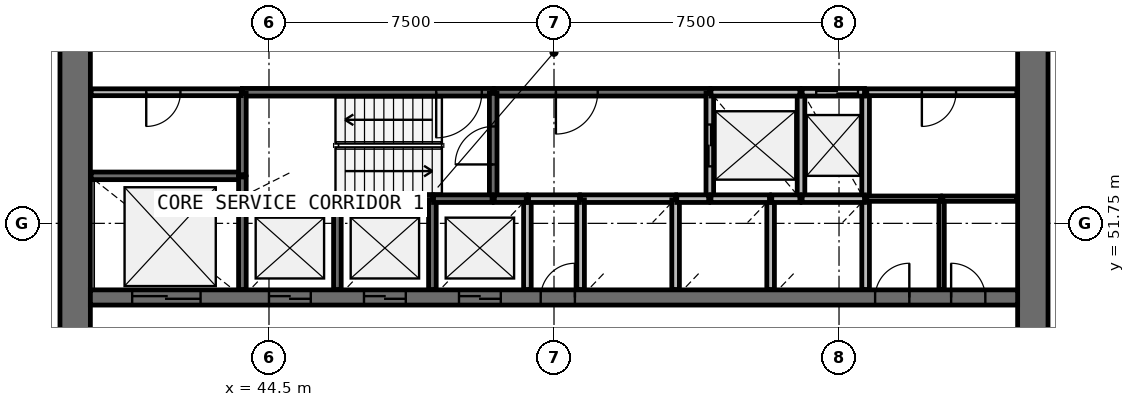
"""IFC4 building model, lengths in metres.
Left out: names, types, materials, properties, quantities, classifications, styles, units other than length and angle.
Written with IfcOpenShell. Run it as: python <this file> out.ifc"""

import sys

from ifc_helpers import new_model, si_unit, direction, frame, frame_2d, origin, place, context, subcontext, project, spatial, rectangle, extrude, source, transform, mapped, element, fill, save


model = new_model("IFC4")
c1 = context("Model", 3, precision=1e-05, world=origin(), true_north=direction((0.0, 1.0)))
c2 = subcontext(c1, "Body", "Model", "MODEL_VIEW")
j1 = project(units=[si_unit("LENGTHUNIT", "METRE"), si_unit("PLANEANGLEUNIT", "RADIAN")], contexts=[c1])
p1 = place(None, origin())
s1 = spatial("IfcSite", under=j1, at=p1, CompositionType="ELEMENT")
p2 = place(p1, origin())
s2 = spatial("IfcBuilding", under=s1, at=p2, CompositionType="ELEMENT")
p3 = place(p2, frame((0.0, 0.0, 116.7)))
s3 = spatial("IfcBuildingStorey", under=s2, at=p3, CompositionType="ELEMENT", Elevation=116.7)
p4 = place(p3, frame((64.6, 38.0, 0.0), z_axis=(0.0, 0.0, 1.0), x_axis=(0.0, 1.0, 0.0)))
e1 = element("IfcWall", 1, at=p4, inside=s3, PredefinedType="SHEAR", context=c2, shape_type="SweptSolid", body=[
    extrude(rectangle(XDim=20.0, YDim=0.8, at=frame_2d((10.0, 0.0))), origin(), (0.0, 0.0, 1.0), 4.1),
])
p5 = place(p4, frame((9.1, 0.0, 0.0)))
e2 = element("IfcOpeningElement", 2, at=p5, cuts=e1, PredefinedType="OPENING", context=c2, shape_type="SweptSolid", body=[
    extrude(rectangle(XDim=1.8, YDim=2.1, at=frame_2d((0.9, 1.05))), frame((0.0, 0.41, 0.0), z_axis=(0.0, -1.0, 0.0), x_axis=(1.0, 0.0, 0.0)), (0.0, 0.0, 1.0), 0.82),
])
p6 = place(p3, frame((39.4, 58.0, 0.0), z_axis=(0.0, 0.0, 1.0), x_axis=(0.0, -1.0, 0.0)))
e3 = element("IfcWall", 3, at=p6, inside=s3, PredefinedType="SHEAR", context=c2, shape_type="SweptSolid", body=[
    extrude(rectangle(XDim=20.0, YDim=0.8, at=frame_2d((10.0, 0.0))), origin(), (0.0, 0.0, 1.0), 4.1),
])
p7 = place(p6, frame((9.1, 0.0, 0.0)))
e4 = element("IfcOpeningElement", 4, at=p7, cuts=e3, PredefinedType="OPENING", context=c2, shape_type="SweptSolid", body=[
    extrude(rectangle(XDim=1.8, YDim=2.1, at=frame_2d((0.9, 1.05))), frame((0.0, 0.41, 0.0), z_axis=(0.0, -1.0, 0.0), x_axis=(1.0, 0.0, 0.0)), (0.0, 0.0, 1.0), 0.82),
])
p8 = place(p3, frame((39.8, 49.8, 0.0), z_axis=(0.0, 0.0, 1.0), x_axis=(1.0, 0.0, 0.0)))
e5 = element("IfcWall", 5, at=p8, inside=s3, PredefinedType="SHEAR", context=c2, shape_type="SweptSolid", body=[
    extrude(rectangle(XDim=24.4, YDim=0.4, at=frame_2d((12.2, 0.0))), origin(), (0.0, 0.0, 1.0), 4.1),
])
p9 = place(p8, frame((4.7, 0.0, 0.0)))
e6 = element("IfcOpeningElement", 6, at=p9, cuts=e5, PredefinedType="OPENING", context=c2, shape_type="SweptSolid", body=[
    extrude(rectangle(XDim=1.1, YDim=2.1, at=frame_2d((0.55, 1.05))), frame((0.0, 0.21, 0.0), z_axis=(0.0, -1.0, 0.0), x_axis=(1.0, 0.0, 0.0)), (0.0, 0.0, 1.0), 0.42),
])
p10 = place(p8, frame((7.2, 0.0, 0.0)))
e7 = element("IfcOpeningElement", 7, at=p10, cuts=e5, PredefinedType="OPENING", context=c2, shape_type="SweptSolid", body=[
    extrude(rectangle(XDim=1.1, YDim=2.1, at=frame_2d((0.55, 1.05))), frame((0.0, 0.21, 0.0), z_axis=(0.0, -1.0, 0.0), x_axis=(1.0, 0.0, 0.0)), (0.0, 0.0, 1.0), 0.42),
])
p11 = place(p8, frame((9.7, 0.0, 0.0)))
e8 = element("IfcOpeningElement", 8, at=p11, cuts=e5, PredefinedType="OPENING", context=c2, shape_type="SweptSolid", body=[
    extrude(rectangle(XDim=1.1, YDim=2.1, at=frame_2d((0.55, 1.05))), frame((0.0, 0.21, 0.0), z_axis=(0.0, -1.0, 0.0), x_axis=(1.0, 0.0, 0.0)), (0.0, 0.0, 1.0), 0.42),
])
p12 = place(p8, frame((1.1, 0.0, 0.0)))
e9 = element("IfcOpeningElement", 9, at=p12, cuts=e5, PredefinedType="OPENING", context=c2, shape_type="SweptSolid", body=[
    extrude(rectangle(XDim=1.8, YDim=2.4, at=frame_2d((0.9, 1.2))), frame((0.0, 0.21, 0.0), z_axis=(0.0, -1.0, 0.0), x_axis=(1.0, 0.0, 0.0)), (0.0, 0.0, 1.0), 0.42),
])
p13 = place(p8, frame((20.65, 0.0, 0.0)))
e10 = element("IfcOpeningElement", 10, at=p13, cuts=e5, PredefinedType="OPENING", context=c2, shape_type="SweptSolid", body=[
    extrude(rectangle(XDim=0.9, YDim=2.1, at=frame_2d((0.45, 1.05))), frame((0.0, 0.21, 0.0), z_axis=(0.0, -1.0, 0.0), x_axis=(1.0, 0.0, 0.0)), (0.0, 0.0, 1.0), 0.42),
])
p14 = place(p8, frame((22.65, 0.0, 0.0)))
e11 = element("IfcOpeningElement", 11, at=p14, cuts=e5, PredefinedType="OPENING", context=c2, shape_type="SweptSolid", body=[
    extrude(rectangle(XDim=0.9, YDim=2.1, at=frame_2d((0.45, 1.05))), frame((0.0, 0.21, 0.0), z_axis=(0.0, -1.0, 0.0), x_axis=(1.0, 0.0, 0.0)), (0.0, 0.0, 1.0), 0.42),
])
p15 = place(p8, frame((11.85, 0.0, 0.0)))
e12 = element("IfcOpeningElement", 12, at=p15, cuts=e5, PredefinedType="OPENING", context=c2, shape_type="SweptSolid", body=[
    extrude(rectangle(XDim=0.9, YDim=2.1, at=frame_2d((0.45, 1.05))), frame((0.0, 0.21, 0.0), z_axis=(0.0, -1.0, 0.0), x_axis=(1.0, 0.0, 0.0)), (0.0, 0.0, 1.0), 0.42),
])
p16 = place(p3, frame((50.4, 55.2, 0.0), z_axis=(0.0, 0.0, 1.0), x_axis=(-1.0, 0.0, 0.0)))
e13 = element("IfcWall", 13, at=p16, inside=s3, PredefinedType="SOLIDWALL", context=c2, shape_type="SweptSolid", body=[
    extrude(rectangle(XDim=6.6, YDim=0.2, at=frame_2d((3.3, 0.0))), origin(), (0.0, 0.0, 1.0), 3.7),
])
p17 = place(p16, frame((0.3, 0.0, 0.0)))
e14 = element("IfcOpeningElement", 14, at=p17, cuts=e13, PredefinedType="OPENING", context=c2, shape_type="SweptSolid", body=[
    extrude(rectangle(XDim=1.2, YDim=2.1, at=frame_2d((0.6, 1.05))), frame((0.0, 0.11, 0.0), z_axis=(0.0, -1.0, 0.0), x_axis=(1.0, 0.0, 0.0)), (0.0, 0.0, 1.0), 0.22),
])
p18 = place(p3, frame((56.1, 55.2, 0.0), z_axis=(0.0, 0.0, 1.0), x_axis=(-1.0, 0.0, 0.0)))
e15 = element("IfcWall", 15, at=p18, inside=s3, PredefinedType="SOLIDWALL", context=c2, shape_type="SweptSolid", body=[
    extrude(rectangle(XDim=5.67, YDim=0.2, at=frame_2d((2.835, 0.0))), origin(), (0.0, 0.0, 1.0), 3.7),
])
p19 = place(p18, frame((2.95, 0.0, 0.0)))
e16 = element("IfcOpeningElement", 16, at=p19, cuts=e15, PredefinedType="OPENING", context=c2, shape_type="SweptSolid", body=[
    extrude(rectangle(XDim=1.1, YDim=2.1, at=frame_2d((0.55, 1.05))), frame((0.0, 0.11, 0.0), z_axis=(0.0, -1.0, 0.0), x_axis=(1.0, 0.0, 0.0)), (0.0, 0.0, 1.0), 0.22),
])
p20 = place(p3, frame((43.8, 53.0, 0.0), z_axis=(0.0, 0.0, 1.0), x_axis=(-1.0, 0.0, 0.0)))
e17 = element("IfcWall", 17, at=p20, inside=s3, PredefinedType="SOLIDWALL", context=c2, shape_type="SweptSolid", body=[
    extrude(rectangle(XDim=3.98, YDim=0.2, at=frame_2d((1.99, 0.0))), origin(), (0.0, 0.0, 1.0), 3.7),
])
p21 = place(p3, frame((50.4, 52.4, 0.0), z_axis=(0.0, 0.0, 1.0), x_axis=(0.0, 1.0, 0.0)))
e18 = element("IfcWall", 18, at=p21, inside=s3, PredefinedType="SOLIDWALL", context=c2, shape_type="SweptSolid", body=[
    extrude(rectangle(XDim=2.77, YDim=0.2, at=frame_2d((1.385, 0.0))), origin(), (0.0, 0.0, 1.0), 3.7),
])
p22 = place(p21, frame((0.9, 0.0, 0.0)))
e19 = element("IfcOpeningElement", 19, at=p22, cuts=e18, PredefinedType="OPENING", context=c2, shape_type="SweptSolid", body=[
    extrude(rectangle(XDim=1.0, YDim=2.1, at=frame_2d((0.5, 1.05))), frame((0.0, 0.11, 0.0), z_axis=(0.0, -1.0, 0.0), x_axis=(1.0, 0.0, 0.0)), (0.0, 0.0, 1.0), 0.22),
])
p23 = place(p3, frame((56.1, 55.17, 0.0), z_axis=(0.0, 0.0, 1.0), x_axis=(0.0, -1.0, 0.0)))
e20 = element("IfcWall", 20, at=p23, inside=s3, PredefinedType="SOLIDWALL", context=c2, shape_type="SweptSolid", body=[
    extrude(rectangle(XDim=2.77, YDim=0.2, at=frame_2d((1.385, 0.0))), origin(), (0.0, 0.0, 1.0), 3.7),
])
p24 = place(p23, frame((0.82, 0.0, 0.0)))
e21 = element("IfcOpeningElement", 21, at=p24, cuts=e20, PredefinedType="OPENING", context=c2, shape_type="SweptSolid", body=[
    extrude(rectangle(XDim=1.1, YDim=2.1, at=frame_2d((0.55, 1.05))), frame((0.0, 0.11, 0.0), z_axis=(0.0, -1.0, 0.0), x_axis=(1.0, 0.0, 0.0)), (0.0, 0.0, 1.0), 0.22),
])
for number, where, z_axis, x_axis in (
    (22, (58.5, 52.4, 0.0), (0.0, 0.0, 1.0), (0.0, 1.0, 0.0)),
    (23, (60.2, 52.4, 0.0), (0.0, 0.0, 1.0), (0.0, 1.0, 0.0)),
):
    element("IfcWall", number, at=place(p3, frame(where, z_axis=z_axis, x_axis=x_axis)), inside=s3, PredefinedType="SOLIDWALL", context=c2, shape_type="SweptSolid", body=[
        extrude(rectangle(XDim=2.8, YDim=0.2, at=frame_2d((1.4, 0.0))), origin(), (0.0, 0.0, 1.0), 3.7),
    ])
p25 = place(p3, frame((46.3, 52.4, 0.0), z_axis=(0.0, 0.0, 1.0), x_axis=(-1.0, 0.0, 0.0)))
e24 = element("IfcWall", 24, at=p25, inside=s3, PredefinedType="SOLIDWALL", context=c2, shape_type="SweptSolid", body=[
    extrude(rectangle(XDim=2.5, YDim=0.2, at=frame_2d((1.25, 0.0))), origin(), (0.0, 0.0, 1.0), 3.7),
])
p26 = place(p3, frame((48.8, 52.4, 0.0), z_axis=(0.0, 0.0, 1.0), x_axis=(-1.0, 0.0, 0.0)))
e25 = element("IfcWall", 25, at=p26, inside=s3, PredefinedType="SOLIDWALL", context=c2, shape_type="SweptSolid", body=[
    extrude(rectangle(XDim=2.47, YDim=0.2, at=frame_2d((1.235, 0.0))), origin(), (0.0, 0.0, 1.0), 3.7),
])
p27 = place(p3, frame((55.2, 52.4, 0.0), z_axis=(0.0, 0.0, 1.0), x_axis=(-1.0, 0.0, 0.0)))
e26 = element("IfcWall", 26, at=p27, inside=s3, PredefinedType="SOLIDWALL", context=c2, shape_type="SweptSolid", body=[
    extrude(rectangle(XDim=2.5, YDim=0.2, at=frame_2d((1.25, 0.0))), origin(), (0.0, 0.0, 1.0), 3.7),
])
p28 = place(p3, frame((58.47, 55.2, 0.0), z_axis=(0.0, 0.0, 1.0), x_axis=(-1.0, 0.0, 0.0)))
e27 = element("IfcWall", 27, at=p28, inside=s3, PredefinedType="SOLIDWALL", context=c2, shape_type="SweptSolid", body=[
    extrude(rectangle(XDim=2.34, YDim=0.2, at=frame_2d((1.17, 0.0))), origin(), (0.0, 0.0, 1.0), 3.7),
])
for number, where, z_axis, x_axis in (
    (28, (43.8, 52.37, 0.0), (0.0, 0.0, 1.0), (0.0, -1.0, 0.0)),
    (29, (46.3, 50.01, 0.0), (0.0, 0.0, 1.0), (0.0, 1.0, 0.0)),
    (30, (48.8, 50.01, 0.0), (0.0, 0.0, 1.0), (0.0, 1.0, 0.0)),
):
    element("IfcWall", number, at=place(p3, frame(where, z_axis=z_axis, x_axis=x_axis)), inside=s3, PredefinedType="SOLIDWALL", context=c2, shape_type="SweptSolid", body=[
        extrude(rectangle(XDim=2.36, YDim=0.2, at=frame_2d((1.18, 0.0))), origin(), (0.0, 0.0, 1.0), 3.7),
    ])
p29 = place(p3, frame((51.3, 50.01, 0.0), z_axis=(0.0, 0.0, 1.0), x_axis=(0.0, 1.0, 0.0)))
e31 = element("IfcWall", 31, at=p29, inside=s3, PredefinedType="SOLIDWALL", context=c2, shape_type="SweptSolid", body=[
    extrude(rectangle(XDim=2.39, YDim=0.2, at=frame_2d((1.195, 0.0))), origin(), (0.0, 0.0, 1.0), 3.7),
])
for number, where, z_axis, x_axis in (
    (32, (52.7, 52.37, 0.0), (0.0, 0.0, 1.0), (0.0, -1.0, 0.0)),
    (33, (55.2, 50.01, 0.0), (0.0, 0.0, 1.0), (0.0, 1.0, 0.0)),
):
    element("IfcWall", number, at=place(p3, frame(where, z_axis=z_axis, x_axis=x_axis)), inside=s3, PredefinedType="SOLIDWALL", context=c2, shape_type="SweptSolid", body=[
        extrude(rectangle(XDim=2.36, YDim=0.2, at=frame_2d((1.18, 0.0))), origin(), (0.0, 0.0, 1.0), 3.7),
    ])
p30 = place(p3, frame((57.7, 50.01, 0.0), z_axis=(0.0, 0.0, 1.0), x_axis=(0.0, 1.0, 0.0)))
e34 = element("IfcWall", 34, at=p30, inside=s3, PredefinedType="SOLIDWALL", context=c2, shape_type="SweptSolid", body=[
    extrude(rectangle(XDim=2.39, YDim=0.2, at=frame_2d((1.195, 0.0))), origin(), (0.0, 0.0, 1.0), 3.7),
])
p31 = place(p3, frame((60.2, 50.01, 0.0), z_axis=(0.0, 0.0, 1.0), x_axis=(0.0, 1.0, 0.0)))
e35 = element("IfcWall", 35, at=p31, inside=s3, PredefinedType="SOLIDWALL", context=c2, shape_type="SweptSolid", body=[
    extrude(rectangle(XDim=2.36, YDim=0.2, at=frame_2d((1.18, 0.0))), origin(), (0.0, 0.0, 1.0), 3.7),
])
p32 = place(p3, frame((43.8, 55.17, 0.0), z_axis=(0.0, 0.0, 1.0), x_axis=(0.0, -1.0, 0.0)))
e36 = element("IfcWall", 36, at=p32, inside=s3, PredefinedType="SOLIDWALL", context=c2, shape_type="SweptSolid", body=[
    extrude(rectangle(XDim=2.14, YDim=0.2, at=frame_2d((1.07, 0.0))), origin(), (0.0, 0.0, 1.0), 3.7),
])
p33 = place(p3, frame((60.17, 52.4, 0.0), z_axis=(0.0, 0.0, 1.0), x_axis=(-1.0, 0.0, 0.0)))
e37 = element("IfcWall", 37, at=p33, inside=s3, PredefinedType="SOLIDWALL", context=c2, shape_type="SweptSolid", body=[
    extrude(rectangle(XDim=1.64, YDim=0.2, at=frame_2d((0.82, 0.0))), origin(), (0.0, 0.0, 1.0), 3.7),
])
p34 = place(p3, frame((60.17, 55.2, 0.0), z_axis=(0.0, 0.0, 1.0), x_axis=(-1.0, 0.0, 0.0)))
e38 = element("IfcWall", 38, at=p34, inside=s3, PredefinedType="SOLIDWALL", context=c2, shape_type="SweptSolid", body=[
    extrude(rectangle(XDim=1.64, YDim=0.2, at=frame_2d((0.82, 0.0))), origin(), (0.0, 0.0, 1.0), 3.7),
])
p35 = place(p34, frame((0.17, 0.0, 0.0)))
e39 = element("IfcOpeningElement", 39, at=p35, cuts=e38, PredefinedType="OPENING", context=c2, shape_type="SweptSolid", body=[
    extrude(rectangle(XDim=1.1, YDim=2.1, at=frame_2d((0.55, 1.05))), frame((0.0, 0.11, 0.0), z_axis=(0.0, -1.0, 0.0), x_axis=(1.0, 0.0, 0.0)), (0.0, 0.0, 1.0), 0.22),
])
for number, where, z_axis, x_axis in (
    (40, (50.37, 52.4, 0.0), (0.0, 0.0, 1.0), (-1.0, 0.0, 0.0)),
    (41, (57.67, 52.4, 0.0), (0.0, 0.0, 1.0), (-1.0, 0.0, 0.0)),
):
    element("IfcWall", number, at=place(p3, frame(where, z_axis=z_axis, x_axis=x_axis)), inside=s3, PredefinedType="SOLIDWALL", context=c2, shape_type="SweptSolid", body=[
        extrude(rectangle(XDim=1.54, YDim=0.2, at=frame_2d((0.77, 0.0))), origin(), (0.0, 0.0, 1.0), 3.7),
    ])
p36 = place(p3, frame((51.33, 52.4, 0.0), z_axis=(0.0, 0.0, 1.0), x_axis=(1.0, 0.0, 0.0)))
e42 = element("IfcWall", 42, at=p36, inside=s3, PredefinedType="SOLIDWALL", context=c2, shape_type="SweptSolid", body=[
    extrude(rectangle(XDim=1.34, YDim=0.2, at=frame_2d((0.67, 0.0))), origin(), (0.0, 0.0, 1.0), 3.7),
])
for number, where, z_axis, x_axis in (
    (43, (51.27, 52.4, 0.0), (0.0, 0.0, 1.0), (-1.0, 0.0, 0.0)),
    (44, (56.07, 52.4, 0.0), (0.0, 0.0, 1.0), (-1.0, 0.0, 0.0)),
):
    element("IfcWall", number, at=place(p3, frame(where, z_axis=z_axis, x_axis=x_axis)), inside=s3, PredefinedType="SOLIDWALL", context=c2, shape_type="SweptSolid", body=[
        extrude(rectangle(XDim=0.84, YDim=0.2, at=frame_2d((0.42, 0.0))), origin(), (0.0, 0.0, 1.0), 3.7),
    ])
p37 = place(p3, frame((58.47, 52.4, 0.0), z_axis=(0.0, 0.0, 1.0), x_axis=(-1.0, 0.0, 0.0)))
e45 = element("IfcWall", 45, at=p37, inside=s3, PredefinedType="SOLIDWALL", context=c2, shape_type="SweptSolid", body=[
    extrude(rectangle(XDim=0.74, YDim=0.2, at=frame_2d((0.37, 0.0))), origin(), (0.0, 0.0, 1.0), 3.7),
])
p38 = place(p3, frame((43.8, 52.43, 0.0), z_axis=(0.0, 0.0, 1.0), x_axis=(0.0, 1.0, 0.0)))
e46 = element("IfcWall", 46, at=p38, inside=s3, PredefinedType="SOLIDWALL", context=c2, shape_type="SweptSolid", body=[
    extrude(rectangle(XDim=0.54, YDim=0.2, at=frame_2d((0.27, 0.0))), origin(), (0.0, 0.0, 1.0), 3.7),
])
p39 = place(p3, frame((64.18, 55.2, 0.0), z_axis=(0.0, 0.0, 1.0), x_axis=(-1.0, 0.0, 0.0)))
e47 = element("IfcWall", 47, at=p39, inside=s3, PredefinedType="PARTITIONING", context=c2, shape_type="SweptSolid", body=[
    extrude(rectangle(XDim=3.95, YDim=0.18, at=frame_2d((1.975, 0.0))), origin(), (0.0, 0.0, 1.0), 3.7),
])
p40 = place(p39, frame((1.6, 0.0, 0.0)))
e48 = element("IfcOpeningElement", 48, at=p40, cuts=e47, PredefinedType="OPENING", context=c2, shape_type="SweptSolid", body=[
    extrude(rectangle(XDim=0.9, YDim=2.1, at=frame_2d((0.45, 1.05))), frame((0.0, 0.1, 0.0), z_axis=(0.0, -1.0, 0.0), x_axis=(1.0, 0.0, 0.0)), (0.0, 0.0, 1.0), 0.2),
])
p41 = place(p3, frame((43.77, 55.2, 0.0), z_axis=(0.0, 0.0, 1.0), x_axis=(-1.0, 0.0, 0.0)))
e49 = element("IfcWall", 49, at=p41, inside=s3, PredefinedType="PARTITIONING", context=c2, shape_type="SweptSolid", body=[
    extrude(rectangle(XDim=3.95, YDim=0.18, at=frame_2d((1.975, 0.0))), origin(), (0.0, 0.0, 1.0), 3.7),
])
p42 = place(p41, frame((1.6, 0.0, 0.0)))
e50 = element("IfcOpeningElement", 50, at=p42, cuts=e49, PredefinedType="OPENING", context=c2, shape_type="SweptSolid", body=[
    extrude(rectangle(XDim=0.9, YDim=2.1, at=frame_2d((0.45, 1.05))), frame((0.0, 0.1, 0.0), z_axis=(0.0, -1.0, 0.0), x_axis=(1.0, 0.0, 0.0)), (0.0, 0.0, 1.0), 0.2),
])
p43 = place(p3, frame((62.2, 50.01, 0.0), z_axis=(0.0, 0.0, 1.0), x_axis=(0.0, 1.0, 0.0)))
e51 = element("IfcWall", 51, at=p43, inside=s3, PredefinedType="PARTITIONING", context=c2, shape_type="SweptSolid", body=[
    extrude(rectangle(XDim=2.39, YDim=0.14, at=frame_2d((1.195, 0.0))), origin(), (0.0, 0.0, 1.0), 2.9),
])
p44 = place(p3, frame((62.17, 52.4, 0.0), z_axis=(0.0, 0.0, 1.0), x_axis=(-1.0, 0.0, 0.0)))
e52 = element("IfcWall", 52, at=p44, inside=s3, PredefinedType="PARTITIONING", context=c2, shape_type="SweptSolid", body=[
    extrude(rectangle(XDim=1.94, YDim=0.14, at=frame_2d((0.97, 0.0))), origin(), (0.0, 0.0, 1.0), 2.9),
])
p45 = place(p3, frame((64.18, 52.4, 0.0), z_axis=(0.0, 0.0, 1.0), x_axis=(-1.0, 0.0, 0.0)))
e53 = element("IfcWall", 53, at=p45, inside=s3, PredefinedType="PARTITIONING", context=c2, shape_type="SweptSolid", body=[
    extrude(rectangle(XDim=1.95, YDim=0.14, at=frame_2d((0.975, 0.0))), origin(), (0.0, 0.0, 1.0), 2.9),
])
m1 = source(origin(), c2, "Body", "SweptSolid", [
    extrude(rectangle(XDim=1.1, YDim=2.1, at=frame_2d((0.55, 1.05))), frame((0.0, 0.025, 0.0), z_axis=(0.0, -1.0, 0.0), x_axis=(1.0, 0.0, 0.0)), (0.0, 0.0, 1.0), 0.05),
])
p46 = place(p9, origin())
e54 = element("IfcDoor", 54, at=p46, inside=s3, OperationType="DOUBLE_DOOR_SLIDING", PredefinedType="USERDEFINED", context=c2, shape_type="MappedRepresentation", body=[
    mapped(m1, transform((0.0, 0.0, 0.0), scale=1.0)),
])
fill(e6, e54)
p47 = place(p10, origin())
e55 = element("IfcDoor", 55, at=p47, inside=s3, OperationType="DOUBLE_DOOR_SLIDING", PredefinedType="USERDEFINED", context=c2, shape_type="MappedRepresentation", body=[
    mapped(m1, transform((0.0, 0.0, 0.0), scale=1.0)),
])
fill(e7, e55)
p48 = place(p11, origin())
e56 = element("IfcDoor", 56, at=p48, inside=s3, OperationType="DOUBLE_DOOR_SLIDING", PredefinedType="USERDEFINED", context=c2, shape_type="MappedRepresentation", body=[
    mapped(m1, transform((0.0, 0.0, 0.0), scale=1.0)),
])
fill(e8, e56)
p49 = place(p24, origin())
e57 = element("IfcDoor", 57, at=p49, inside=s3, OperationType="DOUBLE_DOOR_SLIDING", PredefinedType="USERDEFINED", context=c2, shape_type="MappedRepresentation", body=[
    mapped(m1, transform((0.0, 0.0, 0.0), scale=1.0)),
])
fill(e21, e57)
p50 = place(p35, origin())
e58 = element("IfcDoor", 58, at=p50, inside=s3, OperationType="DOUBLE_DOOR_SLIDING", PredefinedType="USERDEFINED", context=c2, shape_type="MappedRepresentation", body=[
    mapped(m1, transform((0.0, 0.0, 0.0), scale=1.0)),
])
fill(e39, e58)
m2 = source(origin(), c2, "Body", "SweptSolid", [
    extrude(rectangle(XDim=1.8, YDim=2.4, at=frame_2d((0.9, 1.2))), frame((0.0, 0.025, 0.0), z_axis=(0.0, -1.0, 0.0), x_axis=(1.0, 0.0, 0.0)), (0.0, 0.0, 1.0), 0.05),
])
p51 = place(p12, origin())
e59 = element("IfcDoor", 59, at=p51, inside=s3, OperationType="DOUBLE_DOOR_SLIDING", PredefinedType="USERDEFINED", context=c2, shape_type="MappedRepresentation", body=[
    mapped(m2, transform((0.0, 0.0, 0.0), scale=1.0)),
])
fill(e9, e59)
m3 = source(origin(), c2, "Body", "SweptSolid", [
    extrude(rectangle(XDim=1.2, YDim=2.1, at=frame_2d((0.6, 1.05))), frame((0.0, 0.025, 0.0), z_axis=(0.0, -1.0, 0.0), x_axis=(1.0, 0.0, 0.0)), (0.0, 0.0, 1.0), 0.05),
])
p52 = place(p17, origin())
e60 = element("IfcDoor", 60, at=p52, inside=s3, OperationType="SINGLE_SWING_RIGHT", PredefinedType="DOOR", context=c2, shape_type="MappedRepresentation", body=[
    mapped(m3, transform((0.0, 0.0, 0.0), scale=1.0)),
])
fill(e14, e60)
m4 = source(origin(), c2, "Body", "SweptSolid", [
    extrude(rectangle(XDim=1.0, YDim=2.1, at=frame_2d((0.5, 1.05))), frame((0.0, 0.025, 0.0), z_axis=(0.0, -1.0, 0.0), x_axis=(1.0, 0.0, 0.0)), (0.0, 0.0, 1.0), 0.05),
])
p53 = place(p22, origin())
e61 = element("IfcDoor", 61, at=p53, inside=s3, OperationType="SINGLE_SWING_LEFT", PredefinedType="DOOR", context=c2, shape_type="MappedRepresentation", body=[
    mapped(m4, transform((0.0, 0.0, 0.0), scale=1.0)),
])
fill(e19, e61)
m5 = source(origin(), c2, "Body", "SweptSolid", [
    extrude(rectangle(XDim=1.1, YDim=2.1, at=frame_2d((0.55, 1.05))), frame((0.0, 0.025, 0.0), z_axis=(0.0, -1.0, 0.0), x_axis=(1.0, 0.0, 0.0)), (0.0, 0.0, 1.0), 0.05),
])
p54 = place(p19, origin())
e62 = element("IfcDoor", 62, at=p54, inside=s3, OperationType="SINGLE_SWING_RIGHT", PredefinedType="DOOR", context=c2, shape_type="MappedRepresentation", body=[
    mapped(m5, transform((0.0, 0.0, 0.0), scale=1.0)),
])
fill(e16, e62)
m6 = source(origin(), c2, "Body", "SweptSolid", [
    extrude(rectangle(XDim=0.9, YDim=2.1, at=frame_2d((0.45, 1.05))), frame((0.0, 0.025, 0.0), z_axis=(0.0, -1.0, 0.0), x_axis=(1.0, 0.0, 0.0)), (0.0, 0.0, 1.0), 0.05),
])
p55 = place(p42, origin())
e63 = element("IfcDoor", 63, at=p55, inside=s3, OperationType="SINGLE_SWING_RIGHT", PredefinedType="DOOR", context=c2, shape_type="MappedRepresentation", body=[
    mapped(m6, transform((0.0, 0.0, 0.0), scale=1.0)),
])
fill(e50, e63)
p56 = place(p13, origin())
e64 = element("IfcDoor", 64, at=p56, inside=s3, OperationType="SINGLE_SWING_RIGHT", PredefinedType="DOOR", context=c2, shape_type="MappedRepresentation", body=[
    mapped(m6, transform((0.0, 0.0, 0.0), scale=1.0)),
])
fill(e10, e64)
p57 = place(p14, origin())
e65 = element("IfcDoor", 65, at=p57, inside=s3, OperationType="SINGLE_SWING_LEFT", PredefinedType="DOOR", context=c2, shape_type="MappedRepresentation", body=[
    mapped(m6, transform((0.0, 0.0, 0.0), scale=1.0)),
])
fill(e11, e65)
p58 = place(p40, origin())
e66 = element("IfcDoor", 66, at=p58, inside=s3, OperationType="SINGLE_SWING_RIGHT", PredefinedType="DOOR", context=c2, shape_type="MappedRepresentation", body=[
    mapped(m6, transform((0.0, 0.0, 0.0), scale=1.0)),
])
fill(e48, e66)
p59 = place(p15, origin())
e67 = element("IfcDoor", 67, at=p59, inside=s3, OperationType="SINGLE_SWING_RIGHT", PredefinedType="DOOR", context=c2, shape_type="MappedRepresentation", body=[
    mapped(m6, transform((0.0, 0.0, 0.0), scale=1.0)),
])
fill(e12, e67)
save(model, sys.argv[1])
